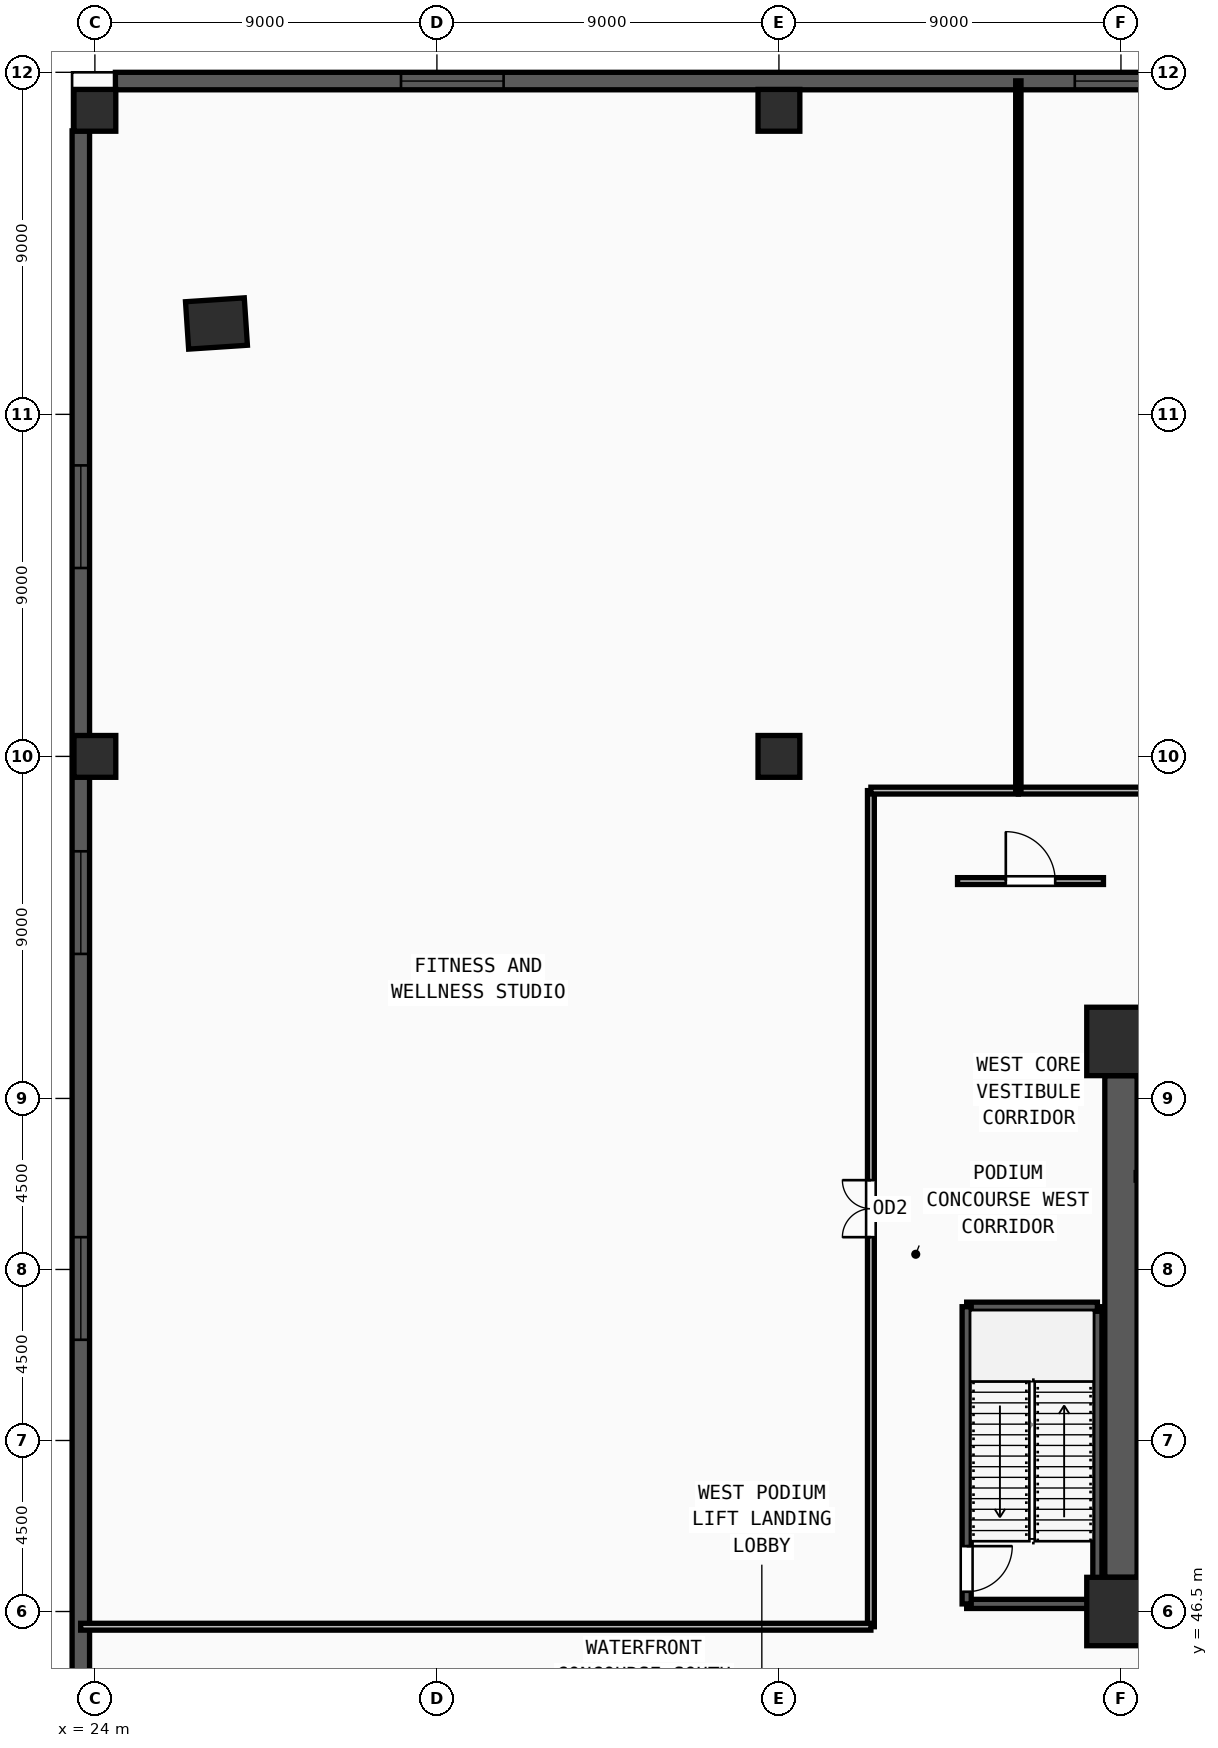
"""IFC4 building model, lengths in metres.
Left out: names, types, materials, properties, quantities, classifications, styles, units other than length and angle.
Written with IfcOpenShell. Run it as: python <this file> out.ifc"""

import sys

from ifc_helpers import new_model, si_unit, direction, frame, frame_2d, origin, origin_2d, place, context, subcontext, project, spatial, rectangle, extrude, source, transform, mapped, element, fill, save


model = new_model("IFC4")
c1 = context("Model", 3, precision=1e-05, world=origin(), true_north=direction((0.0, 1.0)))
c2 = subcontext(c1, "Body", "Model", "MODEL_VIEW")
j1 = project(units=[si_unit("LENGTHUNIT", "METRE"), si_unit("PLANEANGLEUNIT", "RADIAN")], contexts=[c1])
p1 = place(None, origin())
s1 = spatial("IfcSite", under=j1, at=p1, CompositionType="ELEMENT")
p2 = place(p1, origin())
s2 = spatial("IfcBuilding", under=s1, at=p2, CompositionType="ELEMENT")
p3 = place(p2, frame((0.0, 0.0, 23.4)))
s3 = spatial("IfcBuildingStorey", under=s2, at=p3, CompositionType="ELEMENT", Elevation=23.4)
m1 = source(origin(), c2, "Body", "SweptSolid", [
    extrude(rectangle(XDim=1.8, YDim=1.8, at=origin_2d()), origin(), (0.0, 0.0, 1.0), 5.1),
])
for number, where, z_axis, x_axis in (
    (1, (51.0, 46.5, 0.0), (0.0, 0.0, 1.0), (1.0, 0.0, 0.0)),
    (2, (51.0, 61.5, 0.0), (0.0, 0.0, 1.0), (1.0, 0.0, 0.0)),
):
    element("IfcColumn", number, at=place(p3, frame(where, z_axis=z_axis, x_axis=x_axis)), inside=s3, PredefinedType="COLUMN", context=c2, shape_type="MappedRepresentation", body=[
        mapped(m1, transform((0.0, 0.0, 0.0), x_axis=(1.0, 0.0, 0.0), y_axis=(0.0, 1.0, 0.0), z_axis=(0.0, 0.0, 1.0), scale=1.0)),
    ])
m2 = source(origin(), c2, "Body", "SweptSolid", [
    extrude(rectangle(XDim=1.55, YDim=1.25, at=origin_2d()), origin(), (0.0, 0.0, 1.0), 5.1),
])
p4 = place(p3, frame((27.199, 80.391, 0.0), z_axis=(0.0, 0.0, 1.0), x_axis=(0.997824541457, 0.065925597951, 0.0)))
e3 = element("IfcColumn", 3, at=p4, inside=s3, PredefinedType="COLUMN", context=c2, shape_type="MappedRepresentation", body=[
    mapped(m2, transform((0.0, 0.0, 0.0), x_axis=(1.0, 0.0, 0.0), y_axis=(0.0, 1.0, 0.0), z_axis=(0.0, 0.0, 1.0), scale=1.0)),
])
m3 = source(origin(), c2, "Body", "SweptSolid", [
    extrude(rectangle(XDim=1.1, YDim=1.1, at=origin_2d()), origin(), (0.0, 0.0, 1.0), 5.1),
])
for number, where, z_axis, x_axis in (
    (4, (24.0, 69.0, 0.0), (0.0, 0.0, 1.0), (1.0, 0.0, 0.0)),
    (5, (42.0, 69.0, 0.0), (0.0, 0.0, 1.0), (1.0, 0.0, 0.0)),
    (6, (24.0, 86.0, 0.0), (0.0, 0.0, 1.0), (1.0, 0.0, 0.0)),
    (7, (42.0, 86.0, 0.0), (0.0, 0.0, 1.0), (1.0, 0.0, 0.0)),
):
    element("IfcColumn", number, at=place(p3, frame(where, z_axis=z_axis, x_axis=x_axis)), inside=s3, PredefinedType="COLUMN", context=c2, shape_type="MappedRepresentation", body=[
        mapped(m3, transform((0.0, 0.0, 0.0), x_axis=(1.0, 0.0, 0.0), y_axis=(0.0, 1.0, 0.0), z_axis=(0.0, 0.0, 1.0), scale=1.0)),
    ])
p5 = place(p3, frame((95.46, 86.77, 0.0), z_axis=(0.0, 0.0, 1.0), x_axis=(-1.0, 0.0, 0.0)))
e8 = element("IfcWall", 8, at=p5, inside=s3, PredefinedType="SOLIDWALL", context=c2, shape_type="SweptSolid", body=[
    extrude(rectangle(XDim=70.92, YDim=0.46, at=frame_2d((35.46, 0.0))), origin(), (0.0, 0.0, 1.0), 4.82),
])
m4 = source(origin(), c2, "Body", "SweptSolid", [
    extrude(rectangle(XDim=2.7, YDim=2.35, at=frame_2d((1.35, 1.175))), frame((0.0, 0.24, 0.0), z_axis=(0.0, -1.0, 0.0), x_axis=(1.0, 0.0, 0.0)), (0.0, 0.0, 1.0), 0.48),
])
p6 = place(p5, frame((7.515, 0.0, 0.55)))
e9 = element("IfcOpeningElement", 9, at=p6, cuts=e8, PredefinedType="OPENING", context=c2, shape_type="MappedRepresentation", body=[
    mapped(m4, transform((0.0, 0.0, 0.0), x_axis=(1.0, 0.0, 0.0), y_axis=(0.0, 1.0, 0.0), z_axis=(0.0, 0.0, 1.0), scale=1.0)),
])
p7 = place(p5, frame((25.245, 0.0, 0.55)))
e10 = element("IfcOpeningElement", 10, at=p7, cuts=e8, PredefinedType="OPENING", context=c2, shape_type="MappedRepresentation", body=[
    mapped(m4, transform((0.0, 0.0, 0.0), x_axis=(1.0, 0.0, 0.0), y_axis=(0.0, 1.0, 0.0), z_axis=(0.0, 0.0, 1.0), scale=1.0)),
])
p8 = place(p5, frame((34.11, 0.0, 0.55)))
e11 = element("IfcOpeningElement", 11, at=p8, cuts=e8, PredefinedType="OPENING", context=c2, shape_type="MappedRepresentation", body=[
    mapped(m4, transform((0.0, 0.0, 0.0), x_axis=(1.0, 0.0, 0.0), y_axis=(0.0, 1.0, 0.0), z_axis=(0.0, 0.0, 1.0), scale=1.0)),
])
p9 = place(p5, frame((42.975, 0.0, 0.55)))
e12 = element("IfcOpeningElement", 12, at=p9, cuts=e8, PredefinedType="OPENING", context=c2, shape_type="MappedRepresentation", body=[
    mapped(m4, transform((0.0, 0.0, 0.0), x_axis=(1.0, 0.0, 0.0), y_axis=(0.0, 1.0, 0.0), z_axis=(0.0, 0.0, 1.0), scale=1.0)),
])
p10 = place(p5, frame((60.705, 0.0, 0.55)))
e13 = element("IfcOpeningElement", 13, at=p10, cuts=e8, PredefinedType="OPENING", context=c2, shape_type="MappedRepresentation", body=[
    mapped(m4, transform((0.0, 0.0, 0.0), x_axis=(1.0, 0.0, 0.0), y_axis=(0.0, 1.0, 0.0), z_axis=(0.0, 0.0, 1.0), scale=1.0)),
])
p11 = place(p3, frame((23.63, 85.46, 0.0), z_axis=(0.0, 0.0, 1.0), x_axis=(0.0, -1.0, 0.0)))
e14 = element("IfcWall", 14, at=p11, inside=s3, PredefinedType="SOLIDWALL", context=c2, shape_type="SweptSolid", body=[
    extrude(rectangle(XDim=60.92, YDim=0.46, at=frame_2d((30.46, 0.0))), origin(), (0.0, 0.0, 1.0), 4.82),
])
p12 = place(p11, frame((8.803, 0.0, 0.55)))
e15 = element("IfcOpeningElement", 15, at=p12, cuts=e14, PredefinedType="OPENING", context=c2, shape_type="MappedRepresentation", body=[
    mapped(m4, transform((0.0, 0.0, 0.0), x_axis=(1.0, 0.0, 0.0), y_axis=(0.0, 1.0, 0.0), z_axis=(0.0, 0.0, 1.0), scale=1.0)),
])
p13 = place(p11, frame((18.957, 0.0, 0.55)))
e16 = element("IfcOpeningElement", 16, at=p13, cuts=e14, PredefinedType="OPENING", context=c2, shape_type="MappedRepresentation", body=[
    mapped(m4, transform((0.0, 0.0, 0.0), x_axis=(1.0, 0.0, 0.0), y_axis=(0.0, 1.0, 0.0), z_axis=(0.0, 0.0, 1.0), scale=1.0)),
])
p14 = place(p11, frame((29.11, 0.0, 0.55)))
e17 = element("IfcOpeningElement", 17, at=p14, cuts=e14, PredefinedType="OPENING", context=c2, shape_type="MappedRepresentation", body=[
    mapped(m4, transform((0.0, 0.0, 0.0), x_axis=(1.0, 0.0, 0.0), y_axis=(0.0, 1.0, 0.0), z_axis=(0.0, 0.0, 1.0), scale=1.0)),
])
p15 = place(p11, frame((49.417, 0.0, 0.55)))
e18 = element("IfcOpeningElement", 18, at=p15, cuts=e14, PredefinedType="OPENING", context=c2, shape_type="MappedRepresentation", body=[
    mapped(m4, transform((0.0, 0.0, 0.0), x_axis=(1.0, 0.0, 0.0), y_axis=(0.0, 1.0, 0.0), z_axis=(0.0, 0.0, 1.0), scale=1.0)),
])
p16 = place(p3, frame((51.0, 47.4, 0.0), z_axis=(0.0, 0.0, 1.0), x_axis=(0.0, 1.0, 0.0)))
e19 = element("IfcWall", 19, at=p16, inside=s3, PredefinedType="SHEAR", context=c2, shape_type="SweptSolid", body=[
    extrude(rectangle(XDim=13.2, YDim=0.85, at=frame_2d((6.6, 0.0))), origin(), (0.0, 0.0, 1.0), 4.82),
])
p17 = place(p3, frame((46.94, 46.7, 0.0), z_axis=(0.0, 0.0, 1.0), x_axis=(1.0, 0.0, 0.0)))
e20 = element("IfcWall", 20, at=p17, inside=s3, PredefinedType="SOLIDWALL", context=c2, shape_type="SweptSolid", body=[
    extrude(rectangle(XDim=3.44, YDim=0.24, at=frame_2d((1.72, 0.0))), origin(), (0.0, 0.0, 1.0), 4.82),
])
p18 = place(p3, frame((50.38, 46.7, 0.0), z_axis=(0.0, 0.0, 1.0), x_axis=(0.0, 1.0, 0.0)))
e21 = element("IfcWall", 21, at=p18, inside=s3, PredefinedType="SOLIDWALL", context=c2, shape_type="SweptSolid", body=[
    extrude(rectangle(XDim=7.82, YDim=0.24, at=frame_2d((3.91, 0.0))), origin(), (0.0, 0.0, 1.0), 4.82),
])
p19 = place(p3, frame((50.38, 54.52, 0.0), z_axis=(0.0, 0.0, 1.0), x_axis=(-1.0, 0.0, 0.0)))
e22 = element("IfcWall", 22, at=p19, inside=s3, PredefinedType="SOLIDWALL", context=c2, shape_type="SweptSolid", body=[
    extrude(rectangle(XDim=3.44, YDim=0.24, at=frame_2d((1.72, 0.0))), origin(), (0.0, 0.0, 1.0), 4.82),
])
p20 = place(p3, frame((46.94, 54.52, 0.0), z_axis=(0.0, 0.0, 1.0), x_axis=(0.0, -1.0, 0.0)))
e23 = element("IfcWall", 23, at=p20, inside=s3, PredefinedType="SOLIDWALL", context=c2, shape_type="SweptSolid", body=[
    extrude(rectangle(XDim=7.82, YDim=0.24, at=frame_2d((3.91, 0.0))), origin(), (0.0, 0.0, 1.0), 4.82),
])
m5 = source(origin(), c2, "Body", "SweptSolid", [
    extrude(rectangle(XDim=1.2, YDim=2.2, at=frame_2d((0.6, 1.1))), frame((0.0, 0.13, 0.0), z_axis=(0.0, -1.0, 0.0), x_axis=(1.0, 0.0, 0.0)), (0.0, 0.0, 1.0), 0.26),
])
p21 = place(p20, frame((6.3, 0.0, 0.0)))
e24 = element("IfcOpeningElement", 24, at=p21, cuts=e23, PredefinedType="OPENING", context=c2, shape_type="MappedRepresentation", body=[
    mapped(m5, transform((0.0, 0.0, 0.0), x_axis=(1.0, 0.0, 0.0), y_axis=(0.0, 1.0, 0.0), z_axis=(0.0, 0.0, 1.0), scale=1.0)),
])
for number, where, z_axis, x_axis in (
    (25, (51.4, 57.95, 0.0), (0.0, 0.0, 1.0), (1.0, 0.0, 0.0)),
    (26, (53.8, 60.88, 0.0), (0.0, 0.0, 1.0), (-1.0, 0.0, 0.0)),
):
    element("IfcWall", number, at=place(p3, frame(where, z_axis=z_axis, x_axis=x_axis)), inside=s3, PredefinedType="SOLIDWALL", context=c2, shape_type="SweptSolid", body=[
        extrude(rectangle(XDim=2.4, YDim=0.2, at=frame_2d((1.2, 0.0))), origin(), (0.0, 0.0, 1.0), 4.82),
    ])
p22 = place(p3, frame((46.7, 65.72, 0.0), z_axis=(0.0, 0.0, 1.0), x_axis=(1.0, 0.0, 0.0)))
e27 = element("IfcWall", 27, at=p22, inside=s3, PredefinedType="PARTITIONING", context=c2, shape_type="SweptSolid", body=[
    extrude(rectangle(XDim=3.84, YDim=0.18, at=frame_2d((1.92, 0.0))), origin(), (0.0, 0.0, 1.0), 4.82),
])
m6 = source(origin(), c2, "Body", "SweptSolid", [
    extrude(rectangle(XDim=1.3, YDim=2.2, at=frame_2d((0.65, 1.1))), frame((0.0, 0.1, 0.0), z_axis=(0.0, -1.0, 0.0), x_axis=(1.0, 0.0, 0.0)), (0.0, 0.0, 1.0), 0.2),
])
p23 = place(p22, frame((1.27, 0.0, 0.0)))
e28 = element("IfcOpeningElement", 28, at=p23, cuts=e27, PredefinedType="OPENING", context=c2, shape_type="MappedRepresentation", body=[
    mapped(m6, transform((0.0, 0.0, 0.0), x_axis=(1.0, 0.0, 0.0), y_axis=(0.0, 1.0, 0.0), z_axis=(0.0, 0.0, 1.0), scale=1.0)),
])
p24 = place(p3, frame((44.42, 46.1, 0.0), z_axis=(0.0, 0.0, 1.0), x_axis=(0.0, 1.0, 0.0)))
e29 = element("IfcWall", 29, at=p24, inside=s3, PredefinedType="PARTITIONING", context=c2, shape_type="SweptSolid", body=[
    extrude(rectangle(XDim=22.0, YDim=0.18, at=frame_2d((11.0, 0.0))), origin(), (0.0, 0.0, 1.0), 4.82),
])
m7 = source(origin(), c2, "Body", "SweptSolid", [
    extrude(rectangle(XDim=1.5, YDim=2.2, at=frame_2d((0.75, 1.1))), frame((0.0, 0.1, 0.0), z_axis=(0.0, -1.0, 0.0), x_axis=(1.0, 0.0, 0.0)), (0.0, 0.0, 1.0), 0.2),
])
p25 = place(p24, frame((10.25, 0.0, 0.0)))
e30 = element("IfcOpeningElement", 30, at=p25, cuts=e29, PredefinedType="OPENING", context=c2, shape_type="MappedRepresentation", body=[
    mapped(m7, transform((0.0, 0.0, 0.0), x_axis=(1.0, 0.0, 0.0), y_axis=(0.0, 1.0, 0.0), z_axis=(0.0, 0.0, 1.0), scale=1.0)),
])
p26 = place(p3, frame((48.3, 68.1, 0.0), z_axis=(0.0, 0.0, 1.0), x_axis=(1.0, 0.0, 0.0)))
e31 = element("IfcWall", 31, at=p26, inside=s3, PredefinedType="PARTITIONING", context=c2, shape_type="SweptSolid", body=[
    extrude(rectangle(XDim=23.4, YDim=0.18, at=frame_2d((11.7, 0.0))), origin(), (0.0, 0.0, 1.0), 4.82),
])
m8 = source(origin(), c2, "Body", "SweptSolid", [
    extrude(rectangle(XDim=1.4, YDim=2.25, at=frame_2d((0.7, 1.125))), frame((0.0, 0.1, 0.0), z_axis=(0.0, -1.0, 0.0), x_axis=(1.0, 0.0, 0.0)), (0.0, 0.0, 1.0), 0.2),
])
p27 = place(p26, frame((11.0, 0.0, 0.0)))
e32 = element("IfcOpeningElement", 32, at=p27, cuts=e31, PredefinedType="OPENING", context=c2, shape_type="MappedRepresentation", body=[
    mapped(m8, transform((0.0, 0.0, 0.0), x_axis=(1.0, 0.0, 0.0), y_axis=(0.0, 1.0, 0.0), z_axis=(0.0, 0.0, 1.0), scale=1.0)),
])
p28 = place(p3, frame((23.625, 46.1, 0.0), z_axis=(0.0, 0.0, 1.0), x_axis=(1.0, 0.0, 0.0)))
e33 = element("IfcWall", 33, at=p28, inside=s3, PredefinedType="PARTITIONING", context=c2, shape_type="SweptSolid", body=[
    extrude(rectangle(XDim=20.795, YDim=0.18, at=frame_2d((10.397, 0.0))), origin(), (0.0, 0.0, 1.0), 4.82),
])
p29 = place(p3, frame((44.42, 68.1, 0.0), z_axis=(0.0, 0.0, 1.0), x_axis=(1.0, 0.0, 0.0)))
e34 = element("IfcWall", 34, at=p29, inside=s3, PredefinedType="PARTITIONING", context=c2, shape_type="SweptSolid", body=[
    extrude(rectangle(XDim=3.88, YDim=0.18, at=frame_2d((1.94, 0.0))), origin(), (0.0, 0.0, 1.0), 4.82),
])
p30 = place(p3, frame((48.3, 68.1, 0.0), z_axis=(0.0, 0.0, 1.0), x_axis=(0.0, 1.0, 0.0)))
e35 = element("IfcWall", 35, at=p30, inside=s3, PredefinedType="PARTITIONING", context=c2, shape_type="SweptSolid", body=[
    extrude(rectangle(XDim=18.675, YDim=0.14, at=frame_2d((9.337, 0.0))), origin(), (0.0, 0.0, 1.0), 4.82),
])
m9 = source(origin(), c2, "Body", "SweptSolid", [
    extrude(rectangle(XDim=2.7, YDim=2.35, at=frame_2d((1.35, 1.175))), frame((0.0, 0.03, 0.0), z_axis=(0.0, -1.0, 0.0), x_axis=(1.0, 0.0, 0.0)), (0.0, 0.0, 1.0), 0.06),
])
p31 = place(p9, origin())
e36 = element("IfcWindow", 36, at=p31, inside=s3, PartitioningType="TRIPLE_PANEL_VERTICAL", PredefinedType="WINDOW", context=c2, shape_type="MappedRepresentation", body=[
    mapped(m9, transform((0.0, 0.0, 0.0), x_axis=(1.0, 0.0, 0.0), y_axis=(0.0, 1.0, 0.0), z_axis=(0.0, 0.0, 1.0), scale=1.0)),
])
fill(e12, e36)
p32 = place(p10, origin())
e37 = element("IfcWindow", 37, at=p32, inside=s3, PartitioningType="TRIPLE_PANEL_VERTICAL", PredefinedType="WINDOW", context=c2, shape_type="MappedRepresentation", body=[
    mapped(m9, transform((0.0, 0.0, 0.0), x_axis=(1.0, 0.0, 0.0), y_axis=(0.0, 1.0, 0.0), z_axis=(0.0, 0.0, 1.0), scale=1.0)),
])
fill(e13, e37)
p33 = place(p12, origin())
e38 = element("IfcWindow", 38, at=p33, inside=s3, PartitioningType="TRIPLE_PANEL_VERTICAL", PredefinedType="WINDOW", context=c2, shape_type="MappedRepresentation", body=[
    mapped(m9, transform((0.0, 0.0, 0.0), x_axis=(1.0, 0.0, 0.0), y_axis=(0.0, 1.0, 0.0), z_axis=(0.0, 0.0, 1.0), scale=1.0)),
])
fill(e15, e38)
p34 = place(p13, origin())
e39 = element("IfcWindow", 39, at=p34, inside=s3, PartitioningType="TRIPLE_PANEL_VERTICAL", PredefinedType="WINDOW", context=c2, shape_type="MappedRepresentation", body=[
    mapped(m9, transform((0.0, 0.0, 0.0), x_axis=(1.0, 0.0, 0.0), y_axis=(0.0, 1.0, 0.0), z_axis=(0.0, 0.0, 1.0), scale=1.0)),
])
fill(e16, e39)
p35 = place(p14, origin())
e40 = element("IfcWindow", 40, at=p35, inside=s3, PartitioningType="TRIPLE_PANEL_VERTICAL", PredefinedType="WINDOW", context=c2, shape_type="MappedRepresentation", body=[
    mapped(m9, transform((0.0, 0.0, 0.0), x_axis=(1.0, 0.0, 0.0), y_axis=(0.0, 1.0, 0.0), z_axis=(0.0, 0.0, 1.0), scale=1.0)),
])
fill(e17, e40)
m10 = source(origin(), c2, "Body", "SweptSolid", [
    extrude(rectangle(XDim=1.2, YDim=2.2, at=frame_2d((0.6, 1.1))), frame((0.0, 0.025, 0.0), z_axis=(0.0, -1.0, 0.0), x_axis=(1.0, 0.0, 0.0)), (0.0, 0.0, 1.0), 0.05),
])
p36 = place(p21, origin())
e41 = element("IfcDoor", 41, at=p36, inside=s3, OperationType="SINGLE_SWING_LEFT", PredefinedType="DOOR", context=c2, shape_type="MappedRepresentation", body=[
    mapped(m10, transform((0.0, 0.0, 0.0), x_axis=(1.0, 0.0, 0.0), y_axis=(0.0, 1.0, 0.0), z_axis=(0.0, 0.0, 1.0), scale=1.0)),
])
fill(e24, e41)
m11 = source(origin(), c2, "Body", "SweptSolid", [
    extrude(rectangle(XDim=1.3, YDim=2.2, at=frame_2d((0.65, 1.1))), frame((0.0, 0.025, 0.0), z_axis=(0.0, -1.0, 0.0), x_axis=(1.0, 0.0, 0.0)), (0.0, 0.0, 1.0), 0.05),
])
p37 = place(p23, origin())
e42 = element("IfcDoor", 42, at=p37, inside=s3, OperationType="SINGLE_SWING_LEFT", PredefinedType="DOOR", context=c2, shape_type="MappedRepresentation", body=[
    mapped(m11, transform((0.0, 0.0, 0.0), x_axis=(1.0, 0.0, 0.0), y_axis=(0.0, 1.0, 0.0), z_axis=(0.0, 0.0, 1.0), scale=1.0)),
])
fill(e28, e42)
m12 = source(origin(), c2, "Body", "SweptSolid", [
    extrude(rectangle(XDim=1.5, YDim=2.2, at=frame_2d((0.75, 1.1))), frame((0.0, 0.025, 0.0), z_axis=(0.0, -1.0, 0.0), x_axis=(1.0, 0.0, 0.0)), (0.0, 0.0, 1.0), 0.05),
])
p38 = place(p25, origin())
e43 = element("IfcDoor", 43, at=p38, inside=s3, OperationType="DOUBLE_DOOR_SINGLE_SWING", PredefinedType="DOOR", context=c2, shape_type="MappedRepresentation", body=[
    mapped(m12, transform((0.0, 0.0, 0.0), x_axis=(1.0, 0.0, 0.0), y_axis=(0.0, 1.0, 0.0), z_axis=(0.0, 0.0, 1.0), scale=1.0)),
])
fill(e30, e43)
save(model, sys.argv[1])
